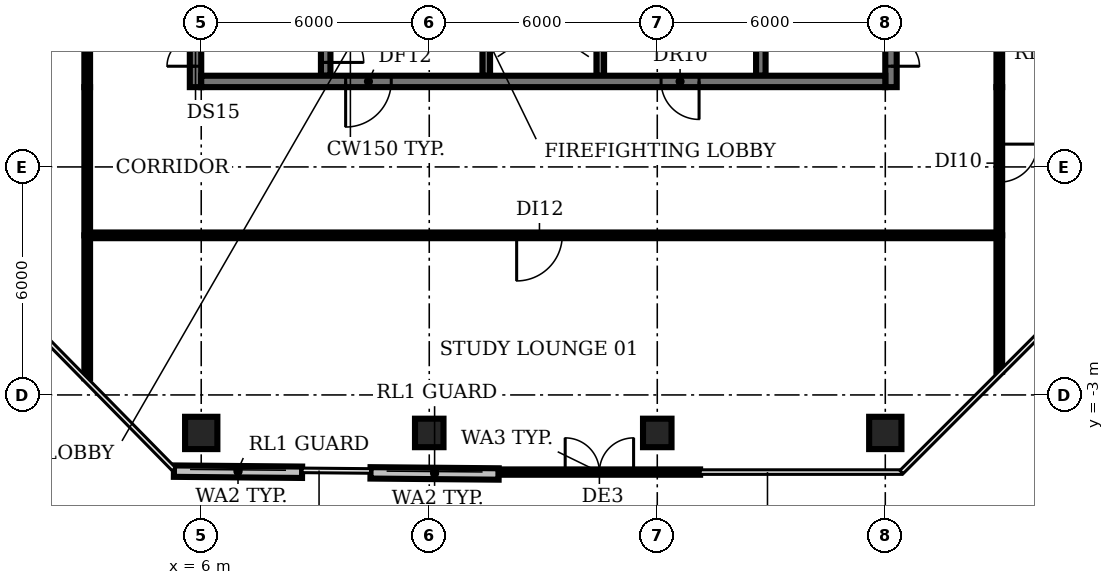
"""IFC4 building model, lengths in metres.
Left out: names, types, materials, properties, quantities, classifications, styles, units other than length and angle.
Written with IfcOpenShell. Run it as: python <this file> out.ifc"""

import sys

from ifc_helpers import new_model, si_unit, direction, frame, frame_2d, origin, origin_2d, place, context, subcontext, project, spatial, rectangle, circle, extrude, element, fill, save


model = new_model("IFC4")
c1 = context("Model", 3, precision=1e-05, world=origin(), true_north=direction((0.0, 1.0)))
c2 = subcontext(c1, "Body", "Model", "MODEL_VIEW")
j1 = project(units=[si_unit("LENGTHUNIT", "METRE"), si_unit("PLANEANGLEUNIT", "RADIAN")], contexts=[c1])
p1 = place(None, origin())
s1 = spatial("IfcSite", under=j1, at=p1, CompositionType="ELEMENT")
p2 = place(p1, origin())
s2 = spatial("IfcBuilding", under=s1, at=p2, CompositionType="ELEMENT")
p3 = place(p2, frame((0.0, 0.0, 285.2)))
s3 = spatial("IfcBuildingStorey", under=s2, at=p3, CompositionType="ELEMENT", Elevation=285.2)
p4 = place(p3, frame((6.0, -4.0, 0.0), z_axis=(0.0, 0.0, 1.0), x_axis=(1.0, 0.0, 0.0)))
e1 = element("IfcColumn", 1, at=p4, inside=s3, PredefinedType="COLUMN", context=c2, shape_type="SweptSolid", body=[
    extrude(circle(Radius=0.425, at=origin_2d()), origin(), (0.0, 0.0, 1.0), 3.85),
])
for number, where, z_axis, x_axis in (
    (2, (12.0, -4.0, 0.0), (0.0, 0.0, 1.0), (1.0, 0.0, 0.0)),
    (3, (18.0, -4.0, 0.0), (0.0, 0.0, 1.0), (1.0, 0.0, 0.0)),
):
    element("IfcColumn", number, at=place(p3, frame(where, z_axis=z_axis, x_axis=x_axis)), inside=s3, PredefinedType="COLUMN", context=c2, shape_type="SweptSolid", body=[
        extrude(rectangle(XDim=0.75, YDim=0.75, at=origin_2d()), origin(), (0.0, 0.0, 1.0), 3.85),
    ])
p5 = place(p3, frame((24.0, -4.0, 0.0), z_axis=(0.0, 0.0, 1.0), x_axis=(1.0, 0.0, 0.0)))
e4 = element("IfcColumn", 4, at=p5, inside=s3, PredefinedType="COLUMN", context=c2, shape_type="SweptSolid", body=[
    extrude(circle(Radius=0.425, at=origin_2d()), origin(), (0.0, 0.0, 1.0), 3.85),
])
p6 = place(p3, frame((5.281, -5.005, 0.0), z_axis=(0.0, 0.0, 1.0), x_axis=(0.999962277007, -0.008685882971, 0.0)))
e5 = element("IfcWall", 5, at=p6, inside=s3, PredefinedType="SOLIDWALL", context=c2, shape_type="SweptSolid", body=[
    extrude(rectangle(XDim=3.373, YDim=0.3, at=frame_2d((1.687, 0.0))), origin(), (0.0, 0.0, 1.0), 3.85),
])
p7 = place(p3, frame((10.454, -5.051, 0.0), z_axis=(0.0, 0.0, 1.0), x_axis=(0.999961640154, -0.008758893764, 0.0)))
e6 = element("IfcWall", 6, at=p7, inside=s3, PredefinedType="SOLIDWALL", context=c2, shape_type="SweptSolid", body=[
    extrude(rectangle(XDim=3.373, YDim=0.3, at=frame_2d((1.687, 0.0))), origin(), (0.0, 0.0, 1.0), 3.85),
])
p8 = place(p3, frame((13.827, -5.03, 0.0), z_axis=(0.0, 0.0, 1.0), x_axis=(1.0, 0.0, 0.0)))
e7 = element("IfcWall", 7, at=p8, inside=s3, PredefinedType="SOLIDWALL", context=c2, shape_type="SweptSolid", body=[
    extrude(rectangle(XDim=5.3, YDim=0.14, at=frame_2d((2.65, 0.0))), origin(), (0.0, 0.0, 1.0), 3.85),
])
p9 = place(p8, frame((1.75, 0.0, 0.0)))
e8 = element("IfcOpeningElement", 8, at=p9, cuts=e7, PredefinedType="OPENING", context=c2, shape_type="SweptSolid", body=[
    extrude(rectangle(XDim=1.8, YDim=2.4, at=frame_2d((0.9, 1.2))), frame((0.0, 0.08, 0.0), z_axis=(0.0, -1.0, 0.0), x_axis=(1.0, 0.0, 0.0)), (0.0, 0.0, 1.0), 0.16),
])
p10 = place(p3, frame((9.275, 11.825, 0.0), z_axis=(0.0, 0.0, 1.0), x_axis=(0.0, -1.0, 0.0)))
e9 = element("IfcWall", 9, at=p10, inside=s3, PredefinedType="SHEAR", context=c2, shape_type="SweptSolid", body=[
    extrude(rectangle(XDim=6.425, YDim=0.25, at=frame_2d((3.212, 0.0))), origin(), (0.0, 0.0, 1.0), 3.85),
])
p11 = place(p10, frame((5.075, 0.0, 0.0)))
e10 = element("IfcOpeningElement", 10, at=p11, cuts=e9, PredefinedType="OPENING", context=c2, shape_type="SweptSolid", body=[
    extrude(rectangle(XDim=1.0, YDim=2.1, at=frame_2d((0.5, 1.05))), frame((0.0, 0.135, 0.0), z_axis=(0.0, -1.0, 0.0), x_axis=(1.0, 0.0, 0.0)), (0.0, 0.0, 1.0), 0.27),
])
p12 = place(p3, frame((13.5, 5.4, 0.0), z_axis=(0.0, 0.0, 1.0), x_axis=(0.0, 1.0, 0.0)))
e11 = element("IfcWall", 11, at=p12, inside=s3, PredefinedType="SHEAR", context=c2, shape_type="SweptSolid", body=[
    extrude(rectangle(XDim=8.2, YDim=0.2, at=frame_2d((4.1, 0.0))), origin(), (0.0, 0.0, 1.0), 3.85),
])
p13 = place(p12, frame((0.75, 0.0, 0.0)))
e12 = element("IfcOpeningElement", 12, at=p13, cuts=e11, PredefinedType="OPENING", context=c2, shape_type="SweptSolid", body=[
    extrude(rectangle(XDim=1.1, YDim=2.1, at=frame_2d((0.55, 1.05))), frame((0.0, 0.11, 0.0), z_axis=(0.0, -1.0, 0.0), x_axis=(1.0, 0.0, 0.0)), (0.0, 0.0, 1.0), 0.22),
])
p14 = place(p12, frame((3.55, 0.0, 0.0)))
e13 = element("IfcOpeningElement", 13, at=p14, cuts=e11, PredefinedType="OPENING", context=c2, shape_type="SweptSolid", body=[
    extrude(rectangle(XDim=1.1, YDim=2.1, at=frame_2d((0.55, 1.05))), frame((0.0, 0.11, 0.0), z_axis=(0.0, -1.0, 0.0), x_axis=(1.0, 0.0, 0.0)), (0.0, 0.0, 1.0), 0.22),
])
p15 = place(p12, frame((6.35, 0.0, 0.0)))
e14 = element("IfcOpeningElement", 14, at=p15, cuts=e11, PredefinedType="OPENING", context=c2, shape_type="SweptSolid", body=[
    extrude(rectangle(XDim=1.1, YDim=2.1, at=frame_2d((0.55, 1.05))), frame((0.0, 0.11, 0.0), z_axis=(0.0, -1.0, 0.0), x_axis=(1.0, 0.0, 0.0)), (0.0, 0.0, 1.0), 0.22),
])
p16 = place(p3, frame((16.5, 5.4, 0.0), z_axis=(0.0, 0.0, 1.0), x_axis=(0.0, 1.0, 0.0)))
e15 = element("IfcWall", 15, at=p16, inside=s3, PredefinedType="SHEAR", context=c2, shape_type="SweptSolid", body=[
    extrude(rectangle(XDim=8.2, YDim=0.2, at=frame_2d((4.1, 0.0))), origin(), (0.0, 0.0, 1.0), 3.85),
])
p17 = place(p3, frame((20.725, 5.4, 0.0), z_axis=(0.0, 0.0, 1.0), x_axis=(0.0, 1.0, 0.0)))
e16 = element("IfcWall", 16, at=p17, inside=s3, PredefinedType="SHEAR", context=c2, shape_type="SweptSolid", body=[
    extrude(rectangle(XDim=8.2, YDim=0.25, at=frame_2d((4.1, 0.0))), origin(), (0.0, 0.0, 1.0), 3.85),
])
p18 = place(p3, frame((5.85, 5.1, 0.0), z_axis=(0.0, 0.0, 1.0), x_axis=(0.0, 1.0, 0.0)))
e17 = element("IfcWall", 17, at=p18, inside=s3, PredefinedType="SHEAR", context=c2, shape_type="SweptSolid", body=[
    extrude(rectangle(XDim=20.0, YDim=0.3, at=frame_2d((10.0, 0.0))), origin(), (0.0, 0.0, 1.0), 3.85),
])
p19 = place(p18, frame((0.55, 0.0, 0.0)))
e18 = element("IfcOpeningElement", 18, at=p19, cuts=e17, PredefinedType="OPENING", context=c2, shape_type="SweptSolid", body=[
    extrude(rectangle(XDim=1.5, YDim=2.1, at=frame_2d((0.75, 1.05))), frame((0.0, 0.16, 0.0), z_axis=(0.0, -1.0, 0.0), x_axis=(1.0, 0.0, 0.0)), (0.0, 0.0, 1.0), 0.32),
])
p20 = place(p18, frame((7.0, 0.0, 0.0)))
e19 = element("IfcOpeningElement", 19, at=p20, cuts=e17, PredefinedType="OPENING", context=c2, shape_type="SweptSolid", body=[
    extrude(rectangle(XDim=1.2, YDim=2.1, at=frame_2d((0.6, 1.05))), frame((0.0, 0.16, 0.0), z_axis=(0.0, -1.0, 0.0), x_axis=(1.0, 0.0, 0.0)), (0.0, 0.0, 1.0), 0.32),
])
p21 = place(p18, frame((13.55, 0.0, 0.0)))
e20 = element("IfcOpeningElement", 20, at=p21, cuts=e17, PredefinedType="OPENING", context=c2, shape_type="SweptSolid", body=[
    extrude(rectangle(XDim=1.2, YDim=2.1, at=frame_2d((0.6, 1.05))), frame((0.0, 0.16, 0.0), z_axis=(0.0, -1.0, 0.0), x_axis=(1.0, 0.0, 0.0)), (0.0, 0.0, 1.0), 0.32),
])
p22 = place(p3, frame((24.15, 25.655, 0.0), z_axis=(0.0, 0.0, 1.0), x_axis=(0.0, -1.0, 0.0)))
e21 = element("IfcWall", 21, at=p22, inside=s3, PredefinedType="SHEAR", context=c2, shape_type="SweptSolid", body=[
    extrude(rectangle(XDim=20.555, YDim=0.3, at=frame_2d((10.277, 0.0))), origin(), (0.0, 0.0, 1.0), 3.85),
])
p23 = place(p22, frame((18.505, 0.0, 0.0)))
e22 = element("IfcOpeningElement", 22, at=p23, cuts=e21, PredefinedType="OPENING", context=c2, shape_type="SweptSolid", body=[
    extrude(rectangle(XDim=1.5, YDim=2.1, at=frame_2d((0.75, 1.05))), frame((0.0, 0.16, 0.0), z_axis=(0.0, -1.0, 0.0), x_axis=(1.0, 0.0, 0.0)), (0.0, 0.0, 1.0), 0.32),
])
p24 = place(p22, frame((12.405, 0.0, 0.0)))
e23 = element("IfcOpeningElement", 23, at=p24, cuts=e21, PredefinedType="OPENING", context=c2, shape_type="SweptSolid", body=[
    extrude(rectangle(XDim=0.9, YDim=2.1, at=frame_2d((0.45, 1.05))), frame((0.0, 0.16, 0.0), z_axis=(0.0, -1.0, 0.0), x_axis=(1.0, 0.0, 0.0)), (0.0, 0.0, 1.0), 0.32),
])
p25 = place(p22, frame((6.405, 0.0, 0.0)))
e24 = element("IfcOpeningElement", 24, at=p25, cuts=e21, PredefinedType="OPENING", context=c2, shape_type="SweptSolid", body=[
    extrude(rectangle(XDim=2.0, YDim=2.1, at=frame_2d((1.0, 1.05))), frame((0.0, 0.16, 0.0), z_axis=(0.0, -1.0, 0.0), x_axis=(1.0, 0.0, 0.0)), (0.0, 0.0, 1.0), 0.32),
])
p26 = place(p3, frame((24.0, 5.25, 0.0), z_axis=(0.0, 0.0, 1.0), x_axis=(-1.0, 0.0, 0.0)))
e25 = element("IfcWall", 25, at=p26, inside=s3, PredefinedType="SHEAR", context=c2, shape_type="SweptSolid", body=[
    extrude(rectangle(XDim=18.0, YDim=0.3, at=frame_2d((9.0, 0.0))), origin(), (0.0, 0.0, 1.0), 3.85),
])
p27 = place(p26, frame((13.0, 0.0, 0.0)))
e26 = element("IfcOpeningElement", 26, at=p27, cuts=e25, PredefinedType="OPENING", context=c2, shape_type="SweptSolid", body=[
    extrude(rectangle(XDim=1.2, YDim=2.1, at=frame_2d((0.6, 1.05))), frame((0.0, 0.16, 0.0), z_axis=(0.0, -1.0, 0.0), x_axis=(1.0, 0.0, 0.0)), (0.0, 0.0, 1.0), 0.32),
])
p28 = place(p26, frame((4.9, 0.0, 0.0)))
e27 = element("IfcOpeningElement", 27, at=p28, cuts=e25, PredefinedType="OPENING", context=c2, shape_type="SweptSolid", body=[
    extrude(rectangle(XDim=1.0, YDim=2.1, at=frame_2d((0.5, 1.05))), frame((0.0, 0.16, 0.0), z_axis=(0.0, -1.0, 0.0), x_axis=(1.0, 0.0, 0.0)), (0.0, 0.0, 1.0), 0.32),
])
p29 = place(p3, frame((3.0, -2.56, 0.0), z_axis=(0.0, 0.0, 1.0), x_axis=(0.0, 1.0, 0.0)))
e28 = element("IfcWall", 28, at=p29, inside=s3, PredefinedType="PARTITIONING", context=c2, shape_type="SweptSolid", body=[
    extrude(rectangle(XDim=3.76, YDim=0.15, at=frame_2d((1.88, 0.0))), origin(), (0.0, 0.0, 1.0), 2.9),
])
p30 = place(p3, frame((3.0, 1.2, 0.0), z_axis=(0.0, 0.0, 1.0), x_axis=(0.0, 1.0, 0.0)))
e29 = element("IfcWall", 29, at=p30, inside=s3, PredefinedType="PARTITIONING", context=c2, shape_type="SweptSolid", body=[
    extrude(rectangle(XDim=3.9, YDim=0.15, at=frame_2d((1.95, 0.0))), origin(), (0.0, 0.0, 1.0), 2.9),
])
p31 = place(p3, frame((3.0, 5.1, 0.0), z_axis=(0.0, 0.0, 1.0), x_axis=(0.0, 1.0, 0.0)))
e30 = element("IfcWall", 30, at=p31, inside=s3, PredefinedType="PARTITIONING", context=c2, shape_type="SweptSolid", body=[
    extrude(rectangle(XDim=20.0, YDim=0.15, at=frame_2d((10.0, 0.0))), origin(), (0.0, 0.0, 1.0), 2.9),
])
p32 = place(p31, frame((9.3, 0.0, 0.0)))
e31 = element("IfcOpeningElement", 31, at=p32, cuts=e30, PredefinedType="OPENING", context=c2, shape_type="SweptSolid", body=[
    extrude(rectangle(XDim=1.2, YDim=2.1, at=frame_2d((0.6, 1.05))), frame((0.0, 0.085, 0.0), z_axis=(0.0, -1.0, 0.0), x_axis=(1.0, 0.0, 0.0)), (0.0, 0.0, 1.0), 0.17),
])
p33 = place(p3, frame((27.0, -2.39, 0.0), z_axis=(0.0, 0.0, 1.0), x_axis=(0.0, 1.0, 0.0)))
e32 = element("IfcWall", 32, at=p33, inside=s3, PredefinedType="PARTITIONING", context=c2, shape_type="SweptSolid", body=[
    extrude(rectangle(XDim=3.59, YDim=0.15, at=frame_2d((1.795, 0.0))), origin(), (0.0, 0.0, 1.0), 2.9),
])
p34 = place(p3, frame((27.0, 1.2, 0.0), z_axis=(0.0, 0.0, 1.0), x_axis=(-1.0, 0.0, 0.0)))
e33 = element("IfcWall", 33, at=p34, inside=s3, PredefinedType="PARTITIONING", context=c2, shape_type="SweptSolid", body=[
    extrude(rectangle(XDim=24.0, YDim=0.15, at=frame_2d((12.0, 0.0))), origin(), (0.0, 0.0, 1.0), 2.9),
])
p35 = place(p34, frame((11.5, 0.0, 0.0)))
e34 = element("IfcOpeningElement", 34, at=p35, cuts=e33, PredefinedType="OPENING", context=c2, shape_type="SweptSolid", body=[
    extrude(rectangle(XDim=1.2, YDim=2.1, at=frame_2d((0.6, 1.05))), frame((0.0, 0.085, 0.0), z_axis=(0.0, -1.0, 0.0), x_axis=(1.0, 0.0, 0.0)), (0.0, 0.0, 1.0), 0.17),
])
p36 = place(p3, frame((27.0, 5.1, 0.0), z_axis=(0.0, 0.0, 1.0), x_axis=(0.0, -1.0, 0.0)))
e35 = element("IfcWall", 35, at=p36, inside=s3, PredefinedType="PARTITIONING", context=c2, shape_type="SweptSolid", body=[
    extrude(rectangle(XDim=3.9, YDim=0.15, at=frame_2d((1.95, 0.0))), origin(), (0.0, 0.0, 1.0), 2.9),
])
p37 = place(p36, frame((1.5, 0.0, 0.0)))
e36 = element("IfcOpeningElement", 36, at=p37, cuts=e35, PredefinedType="OPENING", context=c2, shape_type="SweptSolid", body=[
    extrude(rectangle(XDim=1.0, YDim=2.1, at=frame_2d((0.5, 1.05))), frame((0.0, 0.085, 0.0), z_axis=(0.0, -1.0, 0.0), x_axis=(1.0, 0.0, 0.0)), (0.0, 0.0, 1.0), 0.17),
])
p38 = place(p3, frame((27.0, 5.1, 0.0), z_axis=(0.0, 0.0, 1.0), x_axis=(0.0, 1.0, 0.0)))
e37 = element("IfcWall", 37, at=p38, inside=s3, PredefinedType="PARTITIONING", context=c2, shape_type="SweptSolid", body=[
    extrude(rectangle(XDim=3.75, YDim=0.15, at=frame_2d((1.875, 0.0))), origin(), (0.0, 0.0, 1.0), 2.9),
])
p39 = place(p9, origin())
e38 = element("IfcDoor", 38, at=p39, inside=s3, OperationType="DOUBLE_DOOR_DOUBLE_SWING", PredefinedType="DOOR", context=c2, shape_type="SweptSolid", body=[
    extrude(rectangle(XDim=1.8, YDim=2.4, at=frame_2d((0.9, 1.2))), frame((0.0, 0.025, 0.0), z_axis=(0.0, -1.0, 0.0), x_axis=(1.0, 0.0, 0.0)), (0.0, 0.0, 1.0), 0.05),
])
fill(e8, e38)
p40 = place(p11, origin())
e39 = element("IfcDoor", 39, at=p40, inside=s3, OperationType="SINGLE_SWING_RIGHT", PredefinedType="DOOR", context=c2, shape_type="SweptSolid", body=[
    extrude(rectangle(XDim=1.0, YDim=2.1, at=frame_2d((0.5, 1.05))), frame((0.0, 0.025, 0.0), z_axis=(0.0, -1.0, 0.0), x_axis=(1.0, 0.0, 0.0)), (0.0, 0.0, 1.0), 0.05),
])
fill(e10, e39)
p41 = place(p19, origin())
e40 = element("IfcDoor", 40, at=p41, inside=s3, OperationType="DOUBLE_DOOR_SINGLE_SWING", PredefinedType="DOOR", context=c2, shape_type="SweptSolid", body=[
    extrude(rectangle(XDim=1.5, YDim=2.1, at=frame_2d((0.75, 1.05))), frame((0.0, 0.025, 0.0), z_axis=(0.0, -1.0, 0.0), x_axis=(1.0, 0.0, 0.0)), (0.0, 0.0, 1.0), 0.05),
])
fill(e18, e40)
p42 = place(p23, origin())
e41 = element("IfcDoor", 41, at=p42, inside=s3, OperationType="DOUBLE_DOOR_SINGLE_SWING", PredefinedType="DOOR", context=c2, shape_type="SweptSolid", body=[
    extrude(rectangle(XDim=1.5, YDim=2.1, at=frame_2d((0.75, 1.05))), frame((0.0, 0.025, 0.0), z_axis=(0.0, -1.0, 0.0), x_axis=(1.0, 0.0, 0.0)), (0.0, 0.0, 1.0), 0.05),
])
fill(e22, e41)
p43 = place(p27, origin())
e42 = element("IfcDoor", 42, at=p43, inside=s3, OperationType="SINGLE_SWING_RIGHT", PredefinedType="DOOR", context=c2, shape_type="SweptSolid", body=[
    extrude(rectangle(XDim=1.2, YDim=2.1, at=frame_2d((0.6, 1.05))), frame((0.0, 0.025, 0.0), z_axis=(0.0, -1.0, 0.0), x_axis=(1.0, 0.0, 0.0)), (0.0, 0.0, 1.0), 0.05),
])
fill(e26, e42)
p44 = place(p28, origin())
e43 = element("IfcDoor", 43, at=p44, inside=s3, OperationType="SINGLE_SWING_LEFT", PredefinedType="DOOR", context=c2, shape_type="SweptSolid", body=[
    extrude(rectangle(XDim=1.0, YDim=2.1, at=frame_2d((0.5, 1.05))), frame((0.0, 0.025, 0.0), z_axis=(0.0, -1.0, 0.0), x_axis=(1.0, 0.0, 0.0)), (0.0, 0.0, 1.0), 0.05),
])
fill(e27, e43)
p45 = place(p35, origin())
e44 = element("IfcDoor", 44, at=p45, inside=s3, OperationType="SINGLE_SWING_RIGHT", PredefinedType="DOOR", context=c2, shape_type="SweptSolid", body=[
    extrude(rectangle(XDim=1.2, YDim=2.1, at=frame_2d((0.6, 1.05))), frame((0.0, 0.025, 0.0), z_axis=(0.0, -1.0, 0.0), x_axis=(1.0, 0.0, 0.0)), (0.0, 0.0, 1.0), 0.05),
])
fill(e34, e44)
p46 = place(p37, origin())
e45 = element("IfcDoor", 45, at=p46, inside=s3, OperationType="SINGLE_SWING_LEFT", PredefinedType="DOOR", context=c2, shape_type="SweptSolid", body=[
    extrude(rectangle(XDim=1.0, YDim=2.1, at=frame_2d((0.5, 1.05))), frame((0.0, 0.025, 0.0), z_axis=(0.0, -1.0, 0.0), x_axis=(1.0, 0.0, 0.0)), (0.0, 0.0, 1.0), 0.05),
])
fill(e36, e45)
save(model, sys.argv[1])
